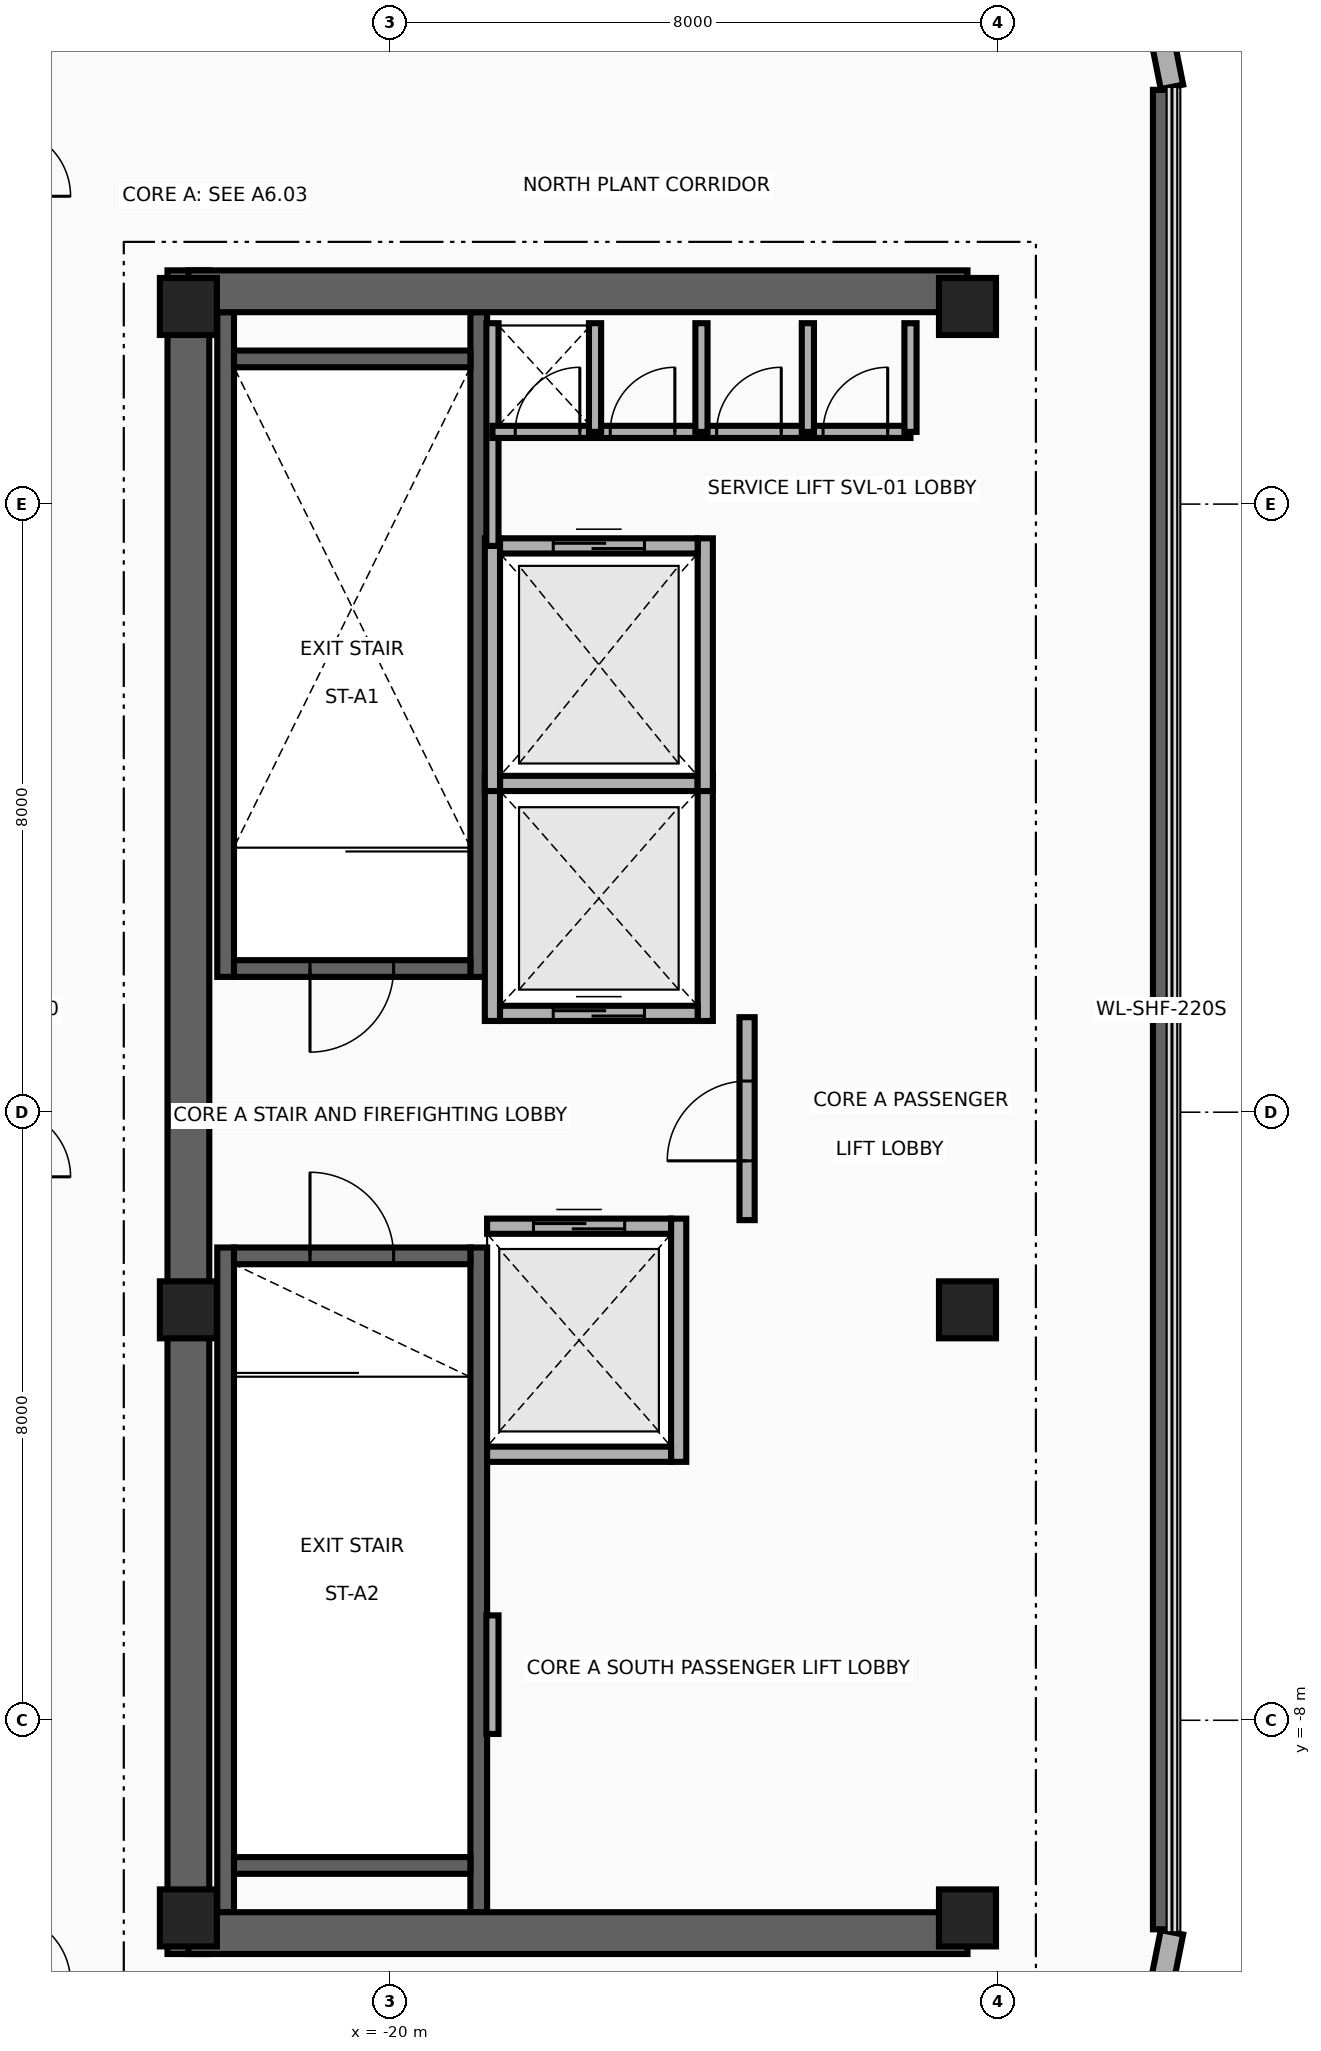
"""IFC4 building model, lengths in metres.
Left out: names, types, materials, properties, quantities, classifications, styles, units other than length and angle.
Written with IfcOpenShell. Run it as: python <this file> out.ifc"""

import sys

from ifc_helpers import new_model, si_unit, direction, frame, frame_2d, origin, origin_2d, place, context, subcontext, project, spatial, rectangle, extrude, source, transform, mapped, element, fill, save


model = new_model("IFC4")
c1 = context("Model", 3, precision=1e-05, world=origin(), true_north=direction((0.0, 1.0)))
c2 = subcontext(c1, "Body", "Model", "MODEL_VIEW")
j1 = project(units=[si_unit("LENGTHUNIT", "METRE"), si_unit("PLANEANGLEUNIT", "RADIAN")], contexts=[c1])
p1 = place(None, origin())
s1 = spatial("IfcSite", under=j1, at=p1, CompositionType="ELEMENT")
p2 = place(p1, origin())
s2 = spatial("IfcBuilding", under=s1, at=p2, CompositionType="ELEMENT")
p3 = place(p2, frame((0.0, 0.0, 303.6)))
s3 = spatial("IfcBuildingStorey", under=s2, at=p3, CompositionType="ELEMENT", Elevation=303.6)
for number, where, z_axis, x_axis in (
    (1, (-22.16, 1.78, 0.0), (0.0, 0.0, 1.0), (0.0, 1.0, 0.0)),
    (2, (-18.83, 1.78, 0.0), (0.0, 0.0, 1.0), (0.0, 1.0, 0.0)),
):
    element("IfcWall", number, at=place(p3, frame(where, z_axis=z_axis, x_axis=x_axis)), inside=s3, PredefinedType="SHEAR", context=c2, shape_type="SweptSolid", body=[
        extrude(rectangle(XDim=8.745, YDim=0.22, at=frame_2d((4.373, 0.0))), origin(), (0.0, 0.0, 1.0), 3.8),
    ])
p4 = place(p3, frame((-22.05, 1.89, 0.0), z_axis=(0.0, 0.0, 1.0), x_axis=(1.0, 0.0, 0.0)))
e3 = element("IfcWall", 3, at=p4, inside=s3, PredefinedType="SHEAR", context=c2, shape_type="SweptSolid", body=[
    extrude(rectangle(XDim=3.11, YDim=0.22, at=frame_2d((1.555, 0.0))), origin(), (0.0, 0.0, 1.0), 3.8),
])
p5 = place(p4, frame((1.0, 0.0, 0.0)))
e4 = element("IfcOpeningElement", 4, at=p5, cuts=e3, PredefinedType="OPENING", context=c2, shape_type="SweptSolid", body=[
    extrude(rectangle(XDim=1.1, YDim=2.15, at=frame_2d((0.55, 1.075))), frame((0.0, 0.125, 0.0), z_axis=(0.0, -1.0, 0.0), x_axis=(1.0, 0.0, 0.0)), (0.0, 0.0, 1.0), 0.25),
])
p6 = place(p3, frame((-22.05, 9.91, 0.0), z_axis=(0.0, 0.0, 1.0), x_axis=(1.0, 0.0, 0.0)))
e5 = element("IfcWall", 5, at=p6, inside=s3, PredefinedType="SHEAR", context=c2, shape_type="SweptSolid", body=[
    extrude(rectangle(XDim=3.11, YDim=0.22, at=frame_2d((1.555, 0.0))), origin(), (0.0, 0.0, 1.0), 3.8),
])
for number, where, z_axis, x_axis in (
    (6, (-22.16, -10.525, 0.0), (0.0, 0.0, 1.0), (0.0, 1.0, 0.0)),
    (7, (-18.83, -10.525, 0.0), (0.0, 0.0, 1.0), (0.0, 1.0, 0.0)),
):
    element("IfcWall", number, at=place(p3, frame(where, z_axis=z_axis, x_axis=x_axis)), inside=s3, PredefinedType="SHEAR", context=c2, shape_type="SweptSolid", body=[
        extrude(rectangle(XDim=8.745, YDim=0.22, at=frame_2d((4.373, 0.0))), origin(), (0.0, 0.0, 1.0), 3.8),
    ])
p7 = place(p3, frame((-22.05, -9.91, 0.0), z_axis=(0.0, 0.0, 1.0), x_axis=(1.0, 0.0, 0.0)))
e8 = element("IfcWall", 8, at=p7, inside=s3, PredefinedType="SHEAR", context=c2, shape_type="SweptSolid", body=[
    extrude(rectangle(XDim=3.11, YDim=0.22, at=frame_2d((1.555, 0.0))), origin(), (0.0, 0.0, 1.0), 3.8),
])
p8 = place(p3, frame((-22.05, -1.89, 0.0), z_axis=(0.0, 0.0, 1.0), x_axis=(1.0, 0.0, 0.0)))
e9 = element("IfcWall", 9, at=p8, inside=s3, PredefinedType="SHEAR", context=c2, shape_type="SweptSolid", body=[
    extrude(rectangle(XDim=3.11, YDim=0.22, at=frame_2d((1.555, 0.0))), origin(), (0.0, 0.0, 1.0), 3.8),
])
p9 = place(p8, frame((1.0, 0.0, 0.0)))
e10 = element("IfcOpeningElement", 10, at=p9, cuts=e9, PredefinedType="OPENING", context=c2, shape_type="SweptSolid", body=[
    extrude(rectangle(XDim=1.1, YDim=2.15, at=frame_2d((0.55, 1.075))), frame((0.0, 0.125, 0.0), z_axis=(0.0, -1.0, 0.0), x_axis=(1.0, 0.0, 0.0)), (0.0, 0.0, 1.0), 0.25),
])
p10 = place(p3, frame((-22.65, -11.075, 0.0), z_axis=(0.0, 0.0, 1.0), x_axis=(0.0, 1.0, 0.0)))
e11 = element("IfcWall", 11, at=p10, inside=s3, PredefinedType="SHEAR", context=c2, shape_type="SweptSolid", body=[
    extrude(rectangle(XDim=22.15, YDim=0.55, at=frame_2d((11.075, 0.0))), origin(), (0.0, 0.0, 1.0), 3.8),
])
for number, where, z_axis, x_axis in (
    (12, (-22.65, 10.8, 0.0), (0.0, 0.0, 1.0), (1.0, 0.0, 0.0)),
    (13, (-22.65, -10.8, 0.0), (0.0, 0.0, 1.0), (1.0, 0.0, 0.0)),
):
    element("IfcWall", number, at=place(p3, frame(where, z_axis=z_axis, x_axis=x_axis)), inside=s3, PredefinedType="SHEAR", context=c2, shape_type="SweptSolid", body=[
        extrude(rectangle(XDim=10.25, YDim=0.55, at=frame_2d((5.125, 0.0))), origin(), (0.0, 0.0, 1.0), 3.8),
    ])
m1 = source(origin(), c2, "Body", "SweptSolid", [
    extrude(rectangle(XDim=0.75, YDim=0.75, at=origin_2d()), origin(), (0.0, 0.0, 1.0), 4.0),
])
for number, where, z_axis, x_axis in (
    (14, (-22.65, -10.6, 0.0), (0.0, 0.0, 1.0), (1.0, 0.0, 0.0)),
    (15, (-12.4, -10.6, 0.0), (0.0, 0.0, 1.0), (1.0, 0.0, 0.0)),
    (16, (-22.65, -2.6, 0.0), (0.0, 0.0, 1.0), (1.0, 0.0, 0.0)),
    (17, (-12.4, -2.6, 0.0), (0.0, 0.0, 1.0), (1.0, 0.0, 0.0)),
    (18, (-22.65, 10.6, 0.0), (0.0, 0.0, 1.0), (1.0, 0.0, 0.0)),
    (19, (-12.4, 10.6, 0.0), (0.0, 0.0, 1.0), (1.0, 0.0, 0.0)),
):
    element("IfcColumn", number, at=place(p3, frame(where, z_axis=z_axis, x_axis=x_axis)), inside=s3, PredefinedType="COLUMN", context=c2, shape_type="MappedRepresentation", body=[
        mapped(m1, transform((0.0, 0.0, 0.0), x_axis=(1.0, 0.0, 0.0), y_axis=(0.0, 1.0, 0.0), z_axis=(0.0, 0.0, 1.0), scale=1.0)),
    ])
p11 = place(p3, frame((-9.85, -10.75, 0.0), z_axis=(0.0, 0.0, 1.0), x_axis=(0.0, 1.0, 0.0)))
e20 = element("IfcWall", 20, at=p11, inside=s3, PredefinedType="SHEAR", context=c2, shape_type="SweptSolid", body=[
    extrude(rectangle(XDim=24.2, YDim=0.22, at=frame_2d((12.1, 0.0))), origin(), (0.0, 0.0, 1.0), 4.22),
])
for number, where, z_axis, x_axis in (
    (21, (-9.932, 14.605, 0.0), (0.0, 0.0, 1.0), (0.195, -0.981, 0.0)),
    (22, (-9.71, -10.789, 0.0), (0.0, 0.0, 1.0), (-0.195, -0.981, 0.0)),
):
    element("IfcWall", number, at=place(p3, frame(where, z_axis=z_axis, x_axis=x_axis)), inside=s3, PredefinedType="SOLIDWALL", context=c2, shape_type="SweptSolid", body=[
        extrude(rectangle(XDim=1.138, YDim=0.3, at=frame_2d((0.569, 0.0))), origin(), (0.0, 0.0, 1.0), 3.8),
    ])
for number, where, z_axis, x_axis in (
    (23, (-18.65, 1.2, 0.0), (0.0, 0.0, 1.0), (0.0, 1.0, 0.0)),
    (24, (-15.85, 1.2, 0.0), (0.0, 0.0, 1.0), (0.0, 1.0, 0.0)),
):
    element("IfcWall", number, at=place(p3, frame(where, z_axis=z_axis, x_axis=x_axis)), inside=s3, PredefinedType="MOVABLE", context=c2, shape_type="SweptSolid", body=[
        extrude(rectangle(XDim=3.225, YDim=0.2, at=frame_2d((1.613, 0.0))), origin(), (0.0, 0.0, 1.0), 3.8),
    ])
p12 = place(p3, frame((-18.55, 1.3, 0.0), z_axis=(0.0, 0.0, 1.0), x_axis=(1.0, 0.0, 0.0)))
e25 = element("IfcWall", 25, at=p12, inside=s3, PredefinedType="MOVABLE", context=c2, shape_type="SweptSolid", body=[
    extrude(rectangle(XDim=2.6, YDim=0.2, at=frame_2d((1.3, 0.0))), origin(), (0.0, 0.0, 1.0), 3.8),
])
p13 = place(p12, frame((0.7, 0.0, 0.0)))
e26 = element("IfcOpeningElement", 26, at=p13, cuts=e25, PredefinedType="OPENING", context=c2, shape_type="SweptSolid", body=[
    extrude(rectangle(XDim=1.2, YDim=2.1, at=frame_2d((0.6, 1.05))), frame((0.0, 0.115, 0.0), z_axis=(0.0, -1.0, 0.0), x_axis=(1.0, 0.0, 0.0)), (0.0, 0.0, 1.0), 0.23),
])
p14 = place(p3, frame((-18.55, 4.325, 0.0), z_axis=(0.0, 0.0, 1.0), x_axis=(1.0, 0.0, 0.0)))
e27 = element("IfcWall", 27, at=p14, inside=s3, PredefinedType="MOVABLE", context=c2, shape_type="SweptSolid", body=[
    extrude(rectangle(XDim=2.6, YDim=0.2, at=frame_2d((1.3, 0.0))), origin(), (0.0, 0.0, 1.0), 3.8),
])
p15 = place(p3, frame((-16.2, -4.6, 0.0), z_axis=(0.0, 0.0, 1.0), x_axis=(0.0, 1.0, 0.0)))
e28 = element("IfcWall", 28, at=p15, inside=s3, PredefinedType="MOVABLE", context=c2, shape_type="SweptSolid", body=[
    extrude(rectangle(XDim=3.2, YDim=0.2, at=frame_2d((1.6, 0.0))), origin(), (0.0, 0.0, 1.0), 3.8),
])
p16 = place(p3, frame((-18.72, -4.5, 0.0), z_axis=(0.0, 0.0, 1.0), x_axis=(1.0, 0.0, 0.0)))
e29 = element("IfcWall", 29, at=p16, inside=s3, PredefinedType="MOVABLE", context=c2, shape_type="SweptSolid", body=[
    extrude(rectangle(XDim=2.42, YDim=0.2, at=frame_2d((1.21, 0.0))), origin(), (0.0, 0.0, 1.0), 3.8),
])
p17 = place(p3, frame((-18.72, -1.5, 0.0), z_axis=(0.0, 0.0, 1.0), x_axis=(1.0, 0.0, 0.0)))
e30 = element("IfcWall", 30, at=p17, inside=s3, PredefinedType="MOVABLE", context=c2, shape_type="SweptSolid", body=[
    extrude(rectangle(XDim=2.42, YDim=0.2, at=frame_2d((1.21, 0.0))), origin(), (0.0, 0.0, 1.0), 3.8),
])
p18 = place(p17, frame((0.61, 0.0, 0.0)))
e31 = element("IfcOpeningElement", 31, at=p18, cuts=e30, PredefinedType="OPENING", context=c2, shape_type="SweptSolid", body=[
    extrude(rectangle(XDim=1.2, YDim=2.1, at=frame_2d((0.6, 1.05))), frame((0.0, 0.115, 0.0), z_axis=(0.0, -1.0, 0.0), x_axis=(1.0, 0.0, 0.0)), (0.0, 0.0, 1.0), 0.23),
])
for number, where, z_axis, x_axis in (
    (32, (-18.65, 4.225, 0.0), (0.0, 0.0, 1.0), (0.0, 1.0, 0.0)),
    (33, (-15.85, 4.225, 0.0), (0.0, 0.0, 1.0), (0.0, 1.0, 0.0)),
):
    element("IfcWall", number, at=place(p3, frame(where, z_axis=z_axis, x_axis=x_axis)), inside=s3, PredefinedType="MOVABLE", context=c2, shape_type="SweptSolid", body=[
        extrude(rectangle(XDim=3.325, YDim=0.2, at=frame_2d((1.663, 0.0))), origin(), (0.0, 0.0, 1.0), 3.8),
    ])
p19 = place(p3, frame((-18.55, 7.45, 0.0), z_axis=(0.0, 0.0, 1.0), x_axis=(1.0, 0.0, 0.0)))
e34 = element("IfcWall", 34, at=p19, inside=s3, PredefinedType="MOVABLE", context=c2, shape_type="SweptSolid", body=[
    extrude(rectangle(XDim=2.6, YDim=0.2, at=frame_2d((1.3, 0.0))), origin(), (0.0, 0.0, 1.0), 3.8),
])
p20 = place(p19, frame((0.7, 0.0, 0.0)))
e35 = element("IfcOpeningElement", 35, at=p20, cuts=e34, PredefinedType="OPENING", context=c2, shape_type="SweptSolid", body=[
    extrude(rectangle(XDim=1.2, YDim=2.1, at=frame_2d((0.6, 1.05))), frame((0.0, 0.115, 0.0), z_axis=(0.0, -1.0, 0.0), x_axis=(1.0, 0.0, 0.0)), (0.0, 0.0, 1.0), 0.23),
])
p21 = place(p3, frame((-15.3, -1.42, 0.0), z_axis=(0.0, 0.0, 1.0), x_axis=(0.0, 1.0, 0.0)))
e36 = element("IfcWall", 36, at=p21, inside=s3, PredefinedType="PARTITIONING", context=c2, shape_type="SweptSolid", body=[
    extrude(rectangle(XDim=2.67, YDim=0.2, at=frame_2d((1.335, 0.0))), origin(), (0.0, 0.0, 1.0), 3.8),
])
p22 = place(p21, frame((0.78, 0.0, 0.0)))
e37 = element("IfcOpeningElement", 37, at=p22, cuts=e36, PredefinedType="OPENING", context=c2, shape_type="SweptSolid", body=[
    extrude(rectangle(XDim=1.05, YDim=2.15, at=frame_2d((0.525, 1.075))), frame((0.0, 0.115, 0.0), z_axis=(0.0, -1.0, 0.0), x_axis=(1.0, 0.0, 0.0)), (0.0, 0.0, 1.0), 0.23),
])
p23 = place(p3, frame((-18.65, 7.45, 0.0), z_axis=(0.0, 0.0, 1.0), x_axis=(0.0, 1.0, 0.0)))
e38 = element("IfcWall", 38, at=p23, inside=s3, PredefinedType="PARTITIONING", context=c2, shape_type="SweptSolid", body=[
    extrude(rectangle(XDim=2.93, YDim=0.16, at=frame_2d((1.465, 0.0))), origin(), (0.0, 0.0, 1.0), 3.8),
])
p24 = place(p3, frame((-18.65, -8.18, 0.0), z_axis=(0.0, 0.0, 1.0), x_axis=(0.0, 1.0, 0.0)))
e39 = element("IfcWall", 39, at=p24, inside=s3, PredefinedType="PARTITIONING", context=c2, shape_type="SweptSolid", body=[
    extrude(rectangle(XDim=1.56, YDim=0.16, at=frame_2d((0.78, 0.0))), origin(), (0.0, 0.0, 1.0), 3.8),
])
p25 = place(p3, frame((-18.65, 8.95, 0.0), z_axis=(0.0, 0.0, 1.0), x_axis=(1.0, 0.0, 0.0)))
e40 = element("IfcWall", 40, at=p25, inside=s3, PredefinedType="PARTITIONING", context=c2, shape_type="SweptSolid", body=[
    extrude(rectangle(XDim=5.5, YDim=0.16, at=frame_2d((2.75, 0.0))), origin(), (0.0, 0.0, 1.0), 3.8),
])
p26 = place(p25, frame((0.3, 0.0, 0.0)))
e41 = element("IfcOpeningElement", 41, at=p26, cuts=e40, PredefinedType="OPENING", context=c2, shape_type="SweptSolid", body=[
    extrude(rectangle(XDim=0.85, YDim=2.05, at=frame_2d((0.425, 1.025))), frame((0.0, 0.095, 0.0), z_axis=(0.0, -1.0, 0.0), x_axis=(1.0, 0.0, 0.0)), (0.0, 0.0, 1.0), 0.19),
])
p27 = place(p25, frame((1.55, 0.0, 0.0)))
e42 = element("IfcOpeningElement", 42, at=p27, cuts=e40, PredefinedType="OPENING", context=c2, shape_type="SweptSolid", body=[
    extrude(rectangle(XDim=0.85, YDim=2.05, at=frame_2d((0.425, 1.025))), frame((0.0, 0.095, 0.0), z_axis=(0.0, -1.0, 0.0), x_axis=(1.0, 0.0, 0.0)), (0.0, 0.0, 1.0), 0.19),
])
p28 = place(p25, frame((2.95, 0.0, 0.0)))
e43 = element("IfcOpeningElement", 43, at=p28, cuts=e40, PredefinedType="OPENING", context=c2, shape_type="SweptSolid", body=[
    extrude(rectangle(XDim=0.85, YDim=2.05, at=frame_2d((0.425, 1.025))), frame((0.0, 0.095, 0.0), z_axis=(0.0, -1.0, 0.0), x_axis=(1.0, 0.0, 0.0)), (0.0, 0.0, 1.0), 0.19),
])
p29 = place(p25, frame((4.35, 0.0, 0.0)))
e44 = element("IfcOpeningElement", 44, at=p29, cuts=e40, PredefinedType="OPENING", context=c2, shape_type="SweptSolid", body=[
    extrude(rectangle(XDim=0.85, YDim=2.05, at=frame_2d((0.425, 1.025))), frame((0.0, 0.095, 0.0), z_axis=(0.0, -1.0, 0.0), x_axis=(1.0, 0.0, 0.0)), (0.0, 0.0, 1.0), 0.19),
])
for number, where, z_axis, x_axis in (
    (45, (-13.15, 8.95, 0.0), (0.0, 0.0, 1.0), (0.0, 1.0, 0.0)),
    (46, (-17.3, 8.95, 0.0), (0.0, 0.0, 1.0), (0.0, 1.0, 0.0)),
    (47, (-15.9, 8.95, 0.0), (0.0, 0.0, 1.0), (0.0, 1.0, 0.0)),
    (48, (-14.5, 8.95, 0.0), (0.0, 0.0, 1.0), (0.0, 1.0, 0.0)),
):
    element("IfcWall", number, at=place(p3, frame(where, z_axis=z_axis, x_axis=x_axis)), inside=s3, PredefinedType="PARTITIONING", context=c2, shape_type="SweptSolid", body=[
        extrude(rectangle(XDim=1.43, YDim=0.16, at=frame_2d((0.715, 0.0))), origin(), (0.0, 0.0, 1.0), 3.8),
    ])
p30 = place(p13, origin())
e49 = element("IfcDoor", 49, at=p30, inside=s3, OperationType="DOUBLE_DOOR_SLIDING", PredefinedType="DOOR", context=c2, shape_type="SweptSolid", body=[
    extrude(rectangle(XDim=1.2, YDim=2.1, at=frame_2d((0.6, 1.05))), frame((0.0, 0.025, 0.0), z_axis=(0.0, -1.0, 0.0), x_axis=(1.0, 0.0, 0.0)), (0.0, 0.0, 1.0), 0.05),
])
fill(e26, e49)
p31 = place(p18, origin())
e50 = element("IfcDoor", 50, at=p31, inside=s3, OperationType="DOUBLE_DOOR_SLIDING", PredefinedType="DOOR", context=c2, shape_type="SweptSolid", body=[
    extrude(rectangle(XDim=1.2, YDim=2.1, at=frame_2d((0.6, 1.05))), frame((0.0, 0.025, 0.0), z_axis=(0.0, -1.0, 0.0), x_axis=(1.0, 0.0, 0.0)), (0.0, 0.0, 1.0), 0.05),
])
fill(e31, e50)
p32 = place(p20, origin())
e51 = element("IfcDoor", 51, at=p32, inside=s3, OperationType="DOUBLE_DOOR_SLIDING", PredefinedType="DOOR", context=c2, shape_type="SweptSolid", body=[
    extrude(rectangle(XDim=1.2, YDim=2.1, at=frame_2d((0.6, 1.05))), frame((0.0, 0.025, 0.0), z_axis=(0.0, -1.0, 0.0), x_axis=(1.0, 0.0, 0.0)), (0.0, 0.0, 1.0), 0.05),
])
fill(e35, e51)
p33 = place(p22, origin())
e52 = element("IfcDoor", 52, at=p33, inside=s3, OperationType="SINGLE_SWING_RIGHT", PredefinedType="DOOR", context=c2, shape_type="SweptSolid", body=[
    extrude(rectangle(XDim=1.05, YDim=2.15, at=frame_2d((0.525, 1.075))), frame((0.0, 0.025, 0.0), z_axis=(0.0, -1.0, 0.0), x_axis=(1.0, 0.0, 0.0)), (0.0, 0.0, 1.0), 0.05),
])
fill(e37, e52)
p34 = place(p5, frame((1.1, 0.0, 0.0), z_axis=(0.0, 0.0, 1.0), x_axis=(-1.0, 0.0, 0.0)))
e53 = element("IfcDoor", 53, at=p34, inside=s3, OperationType="SINGLE_SWING_LEFT", PredefinedType="DOOR", context=c2, shape_type="SweptSolid", body=[
    extrude(rectangle(XDim=1.1, YDim=2.15, at=frame_2d((0.55, 1.075))), frame((0.0, 0.025, 0.0), z_axis=(0.0, -1.0, 0.0), x_axis=(1.0, 0.0, 0.0)), (0.0, 0.0, 1.0), 0.05),
])
fill(e4, e53)
p35 = place(p9, origin())
e54 = element("IfcDoor", 54, at=p35, inside=s3, OperationType="SINGLE_SWING_RIGHT", PredefinedType="DOOR", context=c2, shape_type="SweptSolid", body=[
    extrude(rectangle(XDim=1.1, YDim=2.15, at=frame_2d((0.55, 1.075))), frame((0.0, 0.025, 0.0), z_axis=(0.0, -1.0, 0.0), x_axis=(1.0, 0.0, 0.0)), (0.0, 0.0, 1.0), 0.05),
])
fill(e10, e54)
p36 = place(p26, origin())
e55 = element("IfcDoor", 55, at=p36, inside=s3, OperationType="SINGLE_SWING_LEFT", PredefinedType="DOOR", context=c2, shape_type="SweptSolid", body=[
    extrude(rectangle(XDim=0.85, YDim=2.05, at=frame_2d((0.425, 1.025))), frame((0.0, 0.025, 0.0), z_axis=(0.0, -1.0, 0.0), x_axis=(1.0, 0.0, 0.0)), (0.0, 0.0, 1.0), 0.05),
])
fill(e41, e55)
p37 = place(p27, origin())
e56 = element("IfcDoor", 56, at=p37, inside=s3, OperationType="SINGLE_SWING_RIGHT", PredefinedType="DOOR", context=c2, shape_type="SweptSolid", body=[
    extrude(rectangle(XDim=0.85, YDim=2.05, at=frame_2d((0.425, 1.025))), frame((0.0, 0.025, 0.0), z_axis=(0.0, -1.0, 0.0), x_axis=(1.0, 0.0, 0.0)), (0.0, 0.0, 1.0), 0.05),
])
fill(e42, e56)
p38 = place(p28, origin())
e57 = element("IfcDoor", 57, at=p38, inside=s3, OperationType="SINGLE_SWING_LEFT", PredefinedType="DOOR", context=c2, shape_type="SweptSolid", body=[
    extrude(rectangle(XDim=0.85, YDim=2.05, at=frame_2d((0.425, 1.025))), frame((0.0, 0.025, 0.0), z_axis=(0.0, -1.0, 0.0), x_axis=(1.0, 0.0, 0.0)), (0.0, 0.0, 1.0), 0.05),
])
fill(e43, e57)
p39 = place(p29, origin())
e58 = element("IfcDoor", 58, at=p39, inside=s3, OperationType="SINGLE_SWING_RIGHT", PredefinedType="DOOR", context=c2, shape_type="SweptSolid", body=[
    extrude(rectangle(XDim=0.85, YDim=2.05, at=frame_2d((0.425, 1.025))), frame((0.0, 0.025, 0.0), z_axis=(0.0, -1.0, 0.0), x_axis=(1.0, 0.0, 0.0)), (0.0, 0.0, 1.0), 0.05),
])
fill(e44, e58)
save(model, sys.argv[1])
